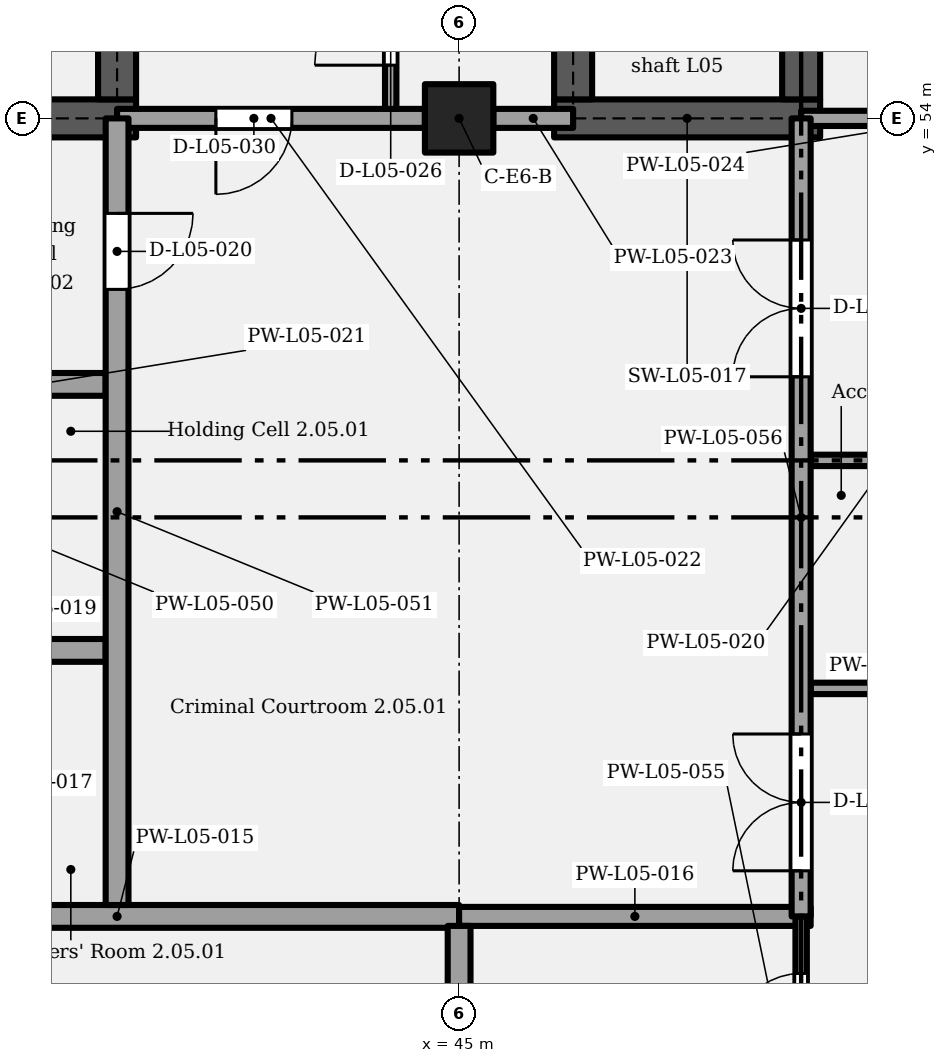
"""IFC4 building model, lengths in metres.
Left out: names, types, materials, properties, quantities, classifications, styles, units other than length and angle.
Written with IfcOpenShell. Run it as: python <this file> out.ifc"""

import sys

from ifc_helpers import new_model, si_unit, direction, frame, frame_2d, origin, origin_2d, place, context, subcontext, project, spatial, rectangle, extrude, element, fill, save


model = new_model("IFC4")
c1 = context("Model", 3, precision=1e-05, world=origin(), true_north=direction((0.0, 1.0)))
c2 = subcontext(c1, "Body", "Model", "MODEL_VIEW")
j1 = project(units=[si_unit("LENGTHUNIT", "METRE"), si_unit("PLANEANGLEUNIT", "RADIAN")], contexts=[c1])
p1 = place(None, origin())
s1 = spatial("IfcSite", under=j1, at=p1, CompositionType="ELEMENT")
p2 = place(p1, origin())
s2 = spatial("IfcBuilding", under=s1, at=p2, CompositionType="ELEMENT")
p3 = place(p2, frame((0.0, 0.0, 28.2)))
s3 = spatial("IfcBuildingStorey", under=s2, at=p3, CompositionType="ELEMENT", Elevation=28.2)
p4 = place(p3, frame((45.0, 54.0, 0.0), z_axis=(0.0, 0.0, 1.0), x_axis=(1.0, 0.0, 0.0)))
e1 = element("IfcColumn", 1, at=p4, inside=s3, PredefinedType="COLUMN", context=c2, shape_type="SweptSolid", body=[
    extrude(rectangle(XDim=0.9, YDim=0.9, at=origin_2d()), origin(), (0.0, 0.0, 1.0), 5.4),
])
p5 = place(p3, frame((38.15, 54.0, 0.0), z_axis=(0.0, 0.0, 1.0), x_axis=(1.0, 0.0, 0.0)))
e2 = element("IfcWall", 2, at=p5, inside=s3, PredefinedType="SHEAR", context=c2, shape_type="SweptSolid", body=[
    extrude(rectangle(XDim=2.6, YDim=0.5, at=frame_2d((1.3, 0.0))), origin(), (0.0, 0.0, 1.0), 5.15),
])
p6 = place(p3, frame((46.25, 54.0, 0.0), z_axis=(0.0, 0.0, 1.0), x_axis=(1.0, 0.0, 0.0)))
e3 = element("IfcWall", 3, at=p6, inside=s3, PredefinedType="SHEAR", context=c2, shape_type="SweptSolid", body=[
    extrude(rectangle(XDim=3.5, YDim=0.5, at=frame_2d((1.75, 0.0))), origin(), (0.0, 0.0, 1.0), 5.15),
])
p7 = place(p3, frame((40.5, 54.25, 0.0), z_axis=(0.0, 0.0, 1.0), x_axis=(0.0, 1.0, 0.0)))
e4 = element("IfcWall", 4, at=p7, inside=s3, PredefinedType="SHEAR", context=c2, shape_type="SweptSolid", body=[
    extrude(rectangle(XDim=11.5, YDim=0.5, at=frame_2d((5.75, 0.0))), origin(), (0.0, 0.0, 1.0), 5.15),
])
p8 = place(p3, frame((46.5, 54.25, 0.0), z_axis=(0.0, 0.0, 1.0), x_axis=(0.0, 1.0, 0.0)))
e5 = element("IfcWall", 5, at=p8, inside=s3, PredefinedType="SHEAR", context=c2, shape_type="SweptSolid", body=[
    extrude(rectangle(XDim=2.5, YDim=0.5, at=frame_2d((1.25, 0.0))), origin(), (0.0, 0.0, 1.0), 5.15),
])
p9 = place(p3, frame((49.5, 54.25, 0.0), z_axis=(0.0, 0.0, 1.0), x_axis=(0.0, 1.0, 0.0)))
e6 = element("IfcWall", 6, at=p9, inside=s3, PredefinedType="SHEAR", context=c2, shape_type="SweptSolid", body=[
    extrude(rectangle(XDim=11.5, YDim=0.5, at=frame_2d((5.75, 0.0))), origin(), (0.0, 0.0, 1.0), 5.15),
])
p10 = place(p9, frame((0.7, 0.0, 0.0)))
e7 = element("IfcOpeningElement", 7, at=p10, cuts=e6, PredefinedType="OPENING", context=c2, shape_type="SweptSolid", body=[
    extrude(rectangle(XDim=1.1, YDim=2.1, at=frame_2d((0.55, 1.05))), frame((0.0, 0.26, 0.0), z_axis=(0.0, -1.0, 0.0), x_axis=(1.0, 0.0, 0.0)), (0.0, 0.0, 1.0), 0.52),
])
p11 = place(p9, frame((4.35, 0.0, 0.0), z_axis=(0.0, 0.0, 1.0), x_axis=(-1.0, 0.0, 0.0)))
e8 = element("IfcOpeningElement", 8, at=p11, cuts=e6, PredefinedType="OPENING", context=c2, shape_type="SweptSolid", body=[
    extrude(rectangle(XDim=1.2, YDim=2.1, at=frame_2d((0.6, 1.05))), frame((0.0, 0.26, 0.0), z_axis=(0.0, -1.0, 0.0), x_axis=(1.0, 0.0, 0.0)), (0.0, 0.0, 1.0), 0.52),
])
p12 = place(p3, frame((36.0, 43.5, 0.0), z_axis=(0.0, 0.0, 1.0), x_axis=(1.0, 0.0, 0.0)))
e9 = element("IfcWall", 9, at=p12, inside=s3, PredefinedType="PARTITIONING", context=c2, shape_type="SweptSolid", body=[
    extrude(rectangle(XDim=9.0, YDim=0.3, at=frame_2d((4.5, 0.0))), origin(), (0.0, 0.0, 1.0), 5.15),
])
p13 = place(p12, frame((1.35, 0.0, 0.0), z_axis=(0.0, 0.0, 1.0), x_axis=(-1.0, 0.0, 0.0)))
e10 = element("IfcOpeningElement", 10, at=p13, cuts=e9, PredefinedType="OPENING", context=c2, shape_type="SweptSolid", body=[
    extrude(rectangle(XDim=0.9, YDim=2.1, at=frame_2d((0.45, 1.05))), frame((0.0, 0.16, 0.0), z_axis=(0.0, -1.0, 0.0), x_axis=(1.0, 0.0, 0.0)), (0.0, 0.0, 1.0), 0.32),
])
p14 = place(p3, frame((45.0, 43.5, 0.0), z_axis=(0.0, 0.0, 1.0), x_axis=(1.0, 0.0, 0.0)))
e11 = element("IfcWall", 11, at=p14, inside=s3, PredefinedType="PARTITIONING", context=c2, shape_type="SweptSolid", body=[
    extrude(rectangle(XDim=4.625, YDim=0.25, at=frame_2d((2.312, 0.0))), origin(), (0.0, 0.0, 1.0), 5.15),
])
p15 = place(p3, frame((49.625, 46.5, 0.0), z_axis=(0.0, 0.0, 1.0), x_axis=(1.0, 0.0, 0.0)))
e12 = element("IfcWall", 12, at=p15, inside=s3, PredefinedType="PARTITIONING", context=c2, shape_type="SweptSolid", body=[
    extrude(rectangle(XDim=2.05, YDim=0.15, at=frame_2d((1.025, 0.0))), origin(), (0.0, 0.0, 1.0), 5.15),
])
p16 = place(p3, frame((38.55, 47.0, 0.0), z_axis=(0.0, 0.0, 1.0), x_axis=(1.0, 0.0, 0.0)))
e13 = element("IfcWall", 13, at=p16, inside=s3, PredefinedType="PARTITIONING", context=c2, shape_type="SweptSolid", body=[
    extrude(rectangle(XDim=1.8, YDim=0.3, at=frame_2d((0.9, 0.0))), origin(), (0.0, 0.0, 1.0), 5.15),
])
p17 = place(p3, frame((49.625, 49.5, 0.0), z_axis=(0.0, 0.0, 1.0), x_axis=(1.0, 0.0, 0.0)))
e14 = element("IfcWall", 14, at=p17, inside=s3, PredefinedType="PARTITIONING", context=c2, shape_type="SweptSolid", body=[
    extrude(rectangle(XDim=2.05, YDim=0.15, at=frame_2d((1.025, 0.0))), origin(), (0.0, 0.0, 1.0), 5.15),
])
p18 = place(p3, frame((38.55, 50.5, 0.0), z_axis=(0.0, 0.0, 1.0), x_axis=(1.0, 0.0, 0.0)))
e15 = element("IfcWall", 15, at=p18, inside=s3, PredefinedType="PARTITIONING", context=c2, shape_type="SweptSolid", body=[
    extrude(rectangle(XDim=1.8, YDim=0.3, at=frame_2d((0.9, 0.0))), origin(), (0.0, 0.0, 1.0), 5.15),
])
p19 = place(p3, frame((40.5, 54.0, 0.0), z_axis=(0.0, 0.0, 1.0), x_axis=(1.0, 0.0, 0.0)))
e16 = element("IfcWall", 16, at=p19, inside=s3, PredefinedType="PARTITIONING", context=c2, shape_type="SweptSolid", body=[
    extrude(rectangle(XDim=4.05, YDim=0.25, at=frame_2d((2.025, 0.0))), origin(), (0.0, 0.0, 1.0), 4.4),
])
p20 = place(p19, frame((2.3, 0.0, 0.0), z_axis=(0.0, 0.0, 1.0), x_axis=(-1.0, 0.0, 0.0)))
e17 = element("IfcOpeningElement", 17, at=p20, cuts=e16, PredefinedType="OPENING", context=c2, shape_type="SweptSolid", body=[
    extrude(rectangle(XDim=1.0, YDim=2.1, at=frame_2d((0.5, 1.05))), frame((0.0, 0.135, 0.0), z_axis=(0.0, -1.0, 0.0), x_axis=(1.0, 0.0, 0.0)), (0.0, 0.0, 1.0), 0.27),
])
p21 = place(p3, frame((45.45, 54.0, 0.0), z_axis=(0.0, 0.0, 1.0), x_axis=(1.0, 0.0, 0.0)))
e18 = element("IfcWall", 18, at=p21, inside=s3, PredefinedType="PARTITIONING", context=c2, shape_type="SweptSolid", body=[
    extrude(rectangle(XDim=1.05, YDim=0.25, at=frame_2d((0.525, 0.0))), origin(), (0.0, 0.0, 1.0), 4.4),
])
p22 = place(p3, frame((49.5, 54.0, 0.0), z_axis=(0.0, 0.0, 1.0), x_axis=(1.0, 0.0, 0.0)))
e19 = element("IfcWall", 19, at=p22, inside=s3, PredefinedType="PARTITIONING", context=c2, shape_type="SweptSolid", body=[
    extrude(rectangle(XDim=4.05, YDim=0.2, at=frame_2d((2.025, 0.0))), origin(), (0.0, 0.0, 1.0), 4.4),
])
p23 = place(p22, frame((1.35, 0.0, 0.0)))
e20 = element("IfcOpeningElement", 20, at=p23, cuts=e19, PredefinedType="OPENING", context=c2, shape_type="SweptSolid", body=[
    extrude(rectangle(XDim=1.8, YDim=2.1, at=frame_2d((0.9, 1.05))), frame((0.0, 0.11, 0.0), z_axis=(0.0, -1.0, 0.0), x_axis=(1.0, 0.0, 0.0)), (0.0, 0.0, 1.0), 0.22),
])
p24 = place(p3, frame((40.5, 43.65, 0.0), z_axis=(0.0, 0.0, 1.0), x_axis=(0.0, 1.0, 0.0)))
e21 = element("IfcWall", 21, at=p24, inside=s3, PredefinedType="PARTITIONING", context=c2, shape_type="SweptSolid", body=[
    extrude(rectangle(XDim=10.35, YDim=0.3, at=frame_2d((5.175, 0.0))), origin(), (0.0, 0.0, 1.0), 5.15),
])
p25 = place(p24, frame((9.1, 0.0, 0.0), z_axis=(0.0, 0.0, 1.0), x_axis=(-1.0, 0.0, 0.0)))
e22 = element("IfcOpeningElement", 22, at=p25, cuts=e21, PredefinedType="OPENING", context=c2, shape_type="SweptSolid", body=[
    extrude(rectangle(XDim=1.0, YDim=2.0, at=frame_2d((0.5, 1.0))), frame((0.0, 0.16, 0.0), z_axis=(0.0, -1.0, 0.0), x_axis=(1.0, 0.0, 0.0)), (0.0, 0.0, 1.0), 0.32),
])
p26 = place(p3, frame((44.1, 54.125, 0.0), z_axis=(0.0, 0.0, 1.0), x_axis=(0.0, 1.0, 0.0)))
e23 = element("IfcWall", 23, at=p26, inside=s3, PredefinedType="PARTITIONING", context=c2, shape_type="SweptSolid", body=[
    extrude(rectangle(XDim=8.8, YDim=0.15, at=frame_2d((4.4, 0.0))), origin(), (0.0, 0.0, 1.0), 5.15),
])
p27 = place(p26, frame((0.575, 0.0, 0.0)))
e24 = element("IfcOpeningElement", 24, at=p27, cuts=e23, PredefinedType="OPENING", context=c2, shape_type="SweptSolid", body=[
    extrude(rectangle(XDim=1.0, YDim=2.1, at=frame_2d((0.5, 1.05))), frame((0.0, 0.085, 0.0), z_axis=(0.0, -1.0, 0.0), x_axis=(1.0, 0.0, 0.0)), (0.0, 0.0, 1.0), 0.17),
])
p28 = place(p26, frame((5.425, 0.0, 0.0)))
e25 = element("IfcOpeningElement", 25, at=p28, cuts=e23, PredefinedType="OPENING", context=c2, shape_type="SweptSolid", body=[
    extrude(rectangle(XDim=0.9, YDim=2.1, at=frame_2d((0.45, 1.05))), frame((0.0, 0.085, 0.0), z_axis=(0.0, -1.0, 0.0), x_axis=(1.0, 0.0, 0.0)), (0.0, 0.0, 1.0), 0.17),
])
p29 = place(p3, frame((45.0, 37.95, 0.0), z_axis=(0.0, 0.0, 1.0), x_axis=(0.0, 1.0, 0.0)))
e26 = element("IfcWall", 26, at=p29, inside=s3, PredefinedType="PARTITIONING", context=c2, shape_type="SweptSolid", body=[
    extrude(rectangle(XDim=5.425, YDim=0.3, at=frame_2d((2.712, 0.0))), origin(), (0.0, 0.0, 1.0), 4.2),
])
p30 = place(p3, frame((49.5, 37.5, 0.0), z_axis=(0.0, 0.0, 1.0), x_axis=(0.0, 1.0, 0.0)))
e27 = element("IfcWall", 27, at=p30, inside=s3, PredefinedType="PARTITIONING", context=c2, shape_type="SweptSolid", body=[
    extrude(rectangle(XDim=6.0, YDim=0.15, at=frame_2d((3.0, 0.0))), origin(), (0.0, 0.0, 1.0), 5.15),
])
p31 = place(p30, frame((1.15, 0.0, 0.0)))
e28 = element("IfcOpeningElement", 28, at=p31, cuts=e27, PredefinedType="OPENING", context=c2, shape_type="SweptSolid", body=[
    extrude(rectangle(XDim=0.9, YDim=2.1, at=frame_2d((0.45, 1.05))), frame((0.0, 0.085, 0.0), z_axis=(0.0, -1.0, 0.0), x_axis=(1.0, 0.0, 0.0)), (0.0, 0.0, 1.0), 0.17),
])
p32 = place(p30, frame((4.35, 0.0, 0.0)))
e29 = element("IfcOpeningElement", 29, at=p32, cuts=e27, PredefinedType="OPENING", context=c2, shape_type="SweptSolid", body=[
    extrude(rectangle(XDim=0.9, YDim=2.1, at=frame_2d((0.45, 1.05))), frame((0.0, 0.085, 0.0), z_axis=(0.0, -1.0, 0.0), x_axis=(1.0, 0.0, 0.0)), (0.0, 0.0, 1.0), 0.17),
])
p33 = place(p3, frame((49.5, 43.5, 0.0), z_axis=(0.0, 0.0, 1.0), x_axis=(0.0, 1.0, 0.0)))
e30 = element("IfcWall", 30, at=p33, inside=s3, PredefinedType="PARTITIONING", context=c2, shape_type="SweptSolid", body=[
    extrude(rectangle(XDim=10.5, YDim=0.25, at=frame_2d((5.25, 0.0))), origin(), (0.0, 0.0, 1.0), 5.15),
])
p34 = place(p33, frame((0.6, 0.0, 0.0)))
e31 = element("IfcOpeningElement", 31, at=p34, cuts=e30, PredefinedType="OPENING", context=c2, shape_type="SweptSolid", body=[
    extrude(rectangle(XDim=1.8, YDim=2.4, at=frame_2d((0.9, 1.2))), frame((0.0, 0.135, 0.0), z_axis=(0.0, -1.0, 0.0), x_axis=(1.0, 0.0, 0.0)), (0.0, 0.0, 1.0), 0.27),
])
p35 = place(p33, frame((7.1, 0.0, 0.0)))
e32 = element("IfcOpeningElement", 32, at=p35, cuts=e30, PredefinedType="OPENING", context=c2, shape_type="SweptSolid", body=[
    extrude(rectangle(XDim=1.8, YDim=2.4, at=frame_2d((0.9, 1.2))), frame((0.0, 0.135, 0.0), z_axis=(0.0, -1.0, 0.0), x_axis=(1.0, 0.0, 0.0)), (0.0, 0.0, 1.0), 0.27),
])
p36 = place(p34, origin())
e33 = element("IfcDoor", 33, at=p36, inside=s3, OperationType="DOUBLE_DOOR_SINGLE_SWING", PredefinedType="DOOR", context=c2, shape_type="SweptSolid", body=[
    extrude(rectangle(XDim=1.8, YDim=2.4, at=frame_2d((0.9, 1.2))), frame((0.0, 0.025, 0.0), z_axis=(0.0, -1.0, 0.0), x_axis=(1.0, 0.0, 0.0)), (0.0, 0.0, 1.0), 0.05),
])
fill(e31, e33)
p37 = place(p35, origin())
e34 = element("IfcDoor", 34, at=p37, inside=s3, OperationType="DOUBLE_DOOR_SINGLE_SWING", PredefinedType="DOOR", context=c2, shape_type="SweptSolid", body=[
    extrude(rectangle(XDim=1.8, YDim=2.4, at=frame_2d((0.9, 1.2))), frame((0.0, 0.025, 0.0), z_axis=(0.0, -1.0, 0.0), x_axis=(1.0, 0.0, 0.0)), (0.0, 0.0, 1.0), 0.05),
])
fill(e32, e34)
p38 = place(p25, origin())
e35 = element("IfcDoor", 35, at=p38, inside=s3, OperationType="SINGLE_SWING_LEFT", PredefinedType="DOOR", context=c2, shape_type="SweptSolid", body=[
    extrude(rectangle(XDim=1.0, YDim=2.0, at=frame_2d((0.5, 1.0))), frame((0.0, 0.025, 0.0), z_axis=(0.0, -1.0, 0.0), x_axis=(1.0, 0.0, 0.0)), (0.0, 0.0, 1.0), 0.05),
])
fill(e22, e35)
p39 = place(p32, origin())
e36 = element("IfcDoor", 36, at=p39, inside=s3, OperationType="SINGLE_SWING_LEFT", PredefinedType="DOOR", context=c2, shape_type="SweptSolid", body=[
    extrude(rectangle(XDim=0.9, YDim=2.1, at=frame_2d((0.45, 1.05))), frame((0.0, 0.025, 0.0), z_axis=(0.0, -1.0, 0.0), x_axis=(1.0, 0.0, 0.0)), (0.0, 0.0, 1.0), 0.05),
])
fill(e29, e36)
p40 = place(p27, origin())
e37 = element("IfcDoor", 37, at=p40, inside=s3, OperationType="SINGLE_SWING_LEFT", PredefinedType="DOOR", context=c2, shape_type="SweptSolid", body=[
    extrude(rectangle(XDim=1.0, YDim=2.1, at=frame_2d((0.5, 1.05))), frame((0.0, 0.025, 0.0), z_axis=(0.0, -1.0, 0.0), x_axis=(1.0, 0.0, 0.0)), (0.0, 0.0, 1.0), 0.05),
])
fill(e24, e37)
p41 = place(p20, origin())
e38 = element("IfcDoor", 38, at=p41, inside=s3, OperationType="SINGLE_SWING_RIGHT", PredefinedType="DOOR", context=c2, shape_type="SweptSolid", body=[
    extrude(rectangle(XDim=1.0, YDim=2.1, at=frame_2d((0.5, 1.05))), frame((0.0, 0.025, 0.0), z_axis=(0.0, -1.0, 0.0), x_axis=(1.0, 0.0, 0.0)), (0.0, 0.0, 1.0), 0.05),
])
fill(e17, e38)
save(model, sys.argv[1])
